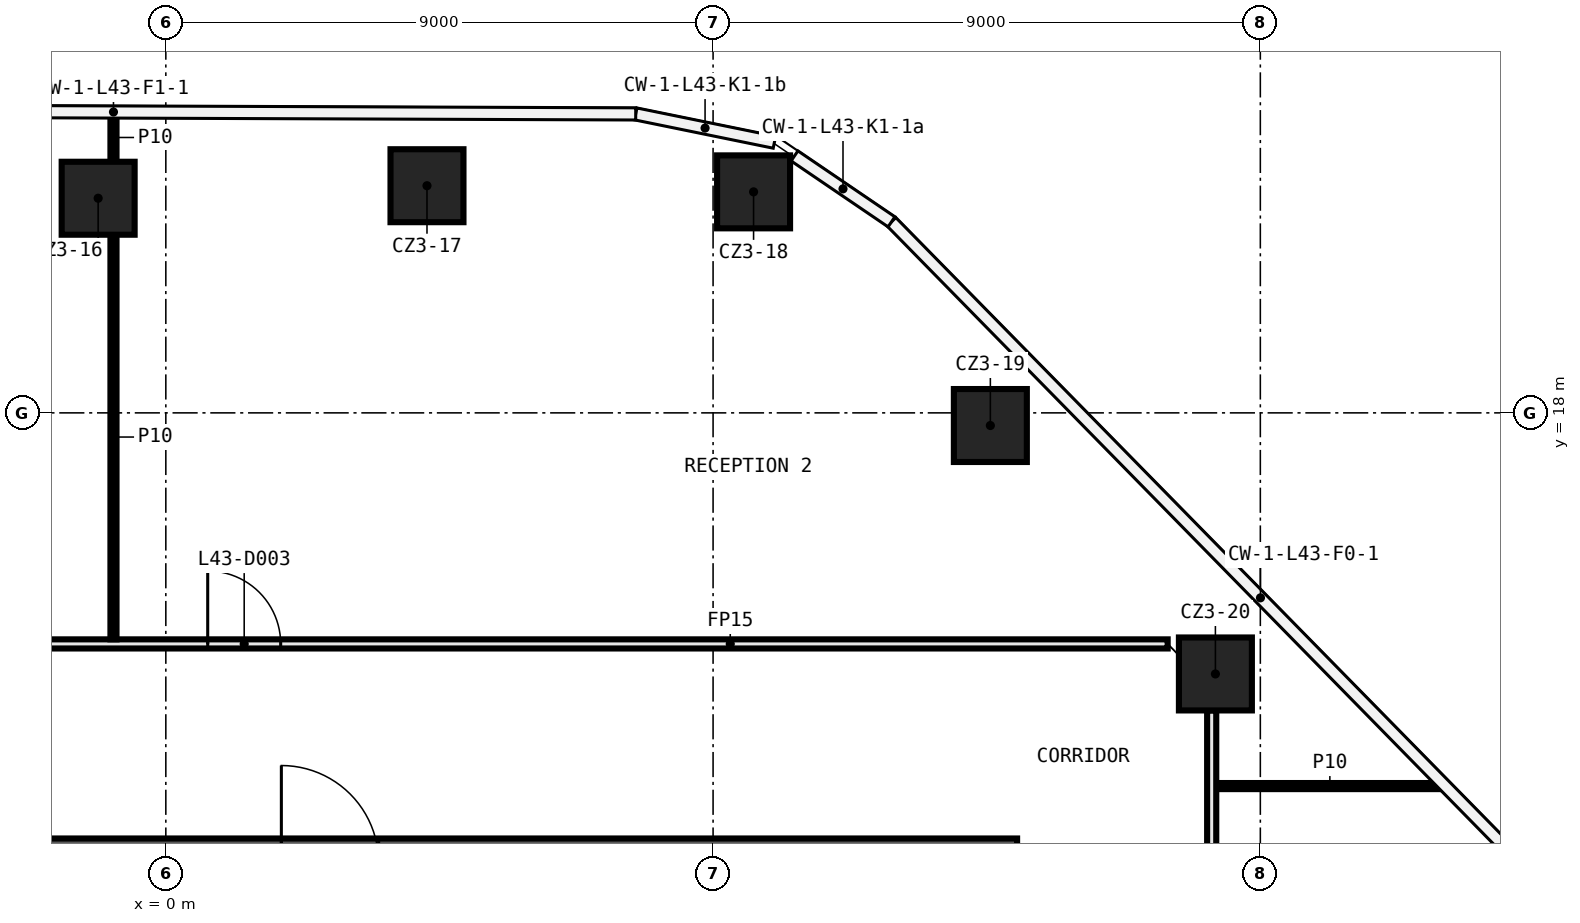
"""IFC4 building model, lengths in metres.
Left out: names, types, materials, properties, quantities, classifications, styles, units other than length and angle.
Written with IfcOpenShell. Run it as: python <this file> out.ifc"""

import sys

from ifc_helpers import new_model, si_unit, direction, frame, frame_2d, origin, origin_2d, place, context, subcontext, project, spatial, rectangle, extrude, element, fill, save


model = new_model("IFC4")
c1 = context("Model", 3, precision=1e-05, world=origin(), true_north=direction((0.0, 1.0)))
c2 = subcontext(c1, "Body", "Model", "MODEL_VIEW")
j1 = project(units=[si_unit("LENGTHUNIT", "METRE"), si_unit("PLANEANGLEUNIT", "RADIAN")], contexts=[c1])
p1 = place(None, origin())
s1 = spatial("IfcSite", under=j1, at=p1, CompositionType="ELEMENT")
p2 = place(p1, origin())
s2 = spatial("IfcBuilding", under=s1, at=p2, CompositionType="ELEMENT")
p3 = place(p2, frame((0.0, 0.0, 207.2)))
s3 = spatial("IfcBuildingStorey", under=s2, at=p3, CompositionType="ELEMENT", Elevation=207.2)
for number, where, z_axis, x_axis in (
    (1, (-1.113, 21.53, 0.0), (0.0, 0.0, 1.0), (1.0, 0.0, 0.0)),
    (2, (4.295, 21.736, 0.0), (0.0, 0.0, 1.0), (1.0, 0.0, 0.0)),
    (3, (9.666, 21.635, 0.0), (0.0, 0.0, 1.0), (1.0, 0.0, 0.0)),
    (4, (13.56, 17.792, 0.0), (0.0, 0.0, 1.0), (1.0, 0.0, 0.0)),
    (5, (17.261, 13.706, 0.0), (0.0, 0.0, 1.0), (1.0, 0.0, 0.0)),
):
    element("IfcColumn", number, at=place(p3, frame(where, z_axis=z_axis, x_axis=x_axis)), inside=s3, PredefinedType="COLUMN", context=c2, shape_type="SweptSolid", body=[
        extrude(rectangle(XDim=1.2, YDim=1.2, at=origin_2d()), origin(), (0.0, 0.0, 1.0), 3.82),
    ])
p4 = place(p3, frame((17.275, 11.862, 0.0), z_axis=(0.0, 0.0, 1.0), x_axis=(1.0, 0.0, 0.0)))
e6 = element("IfcWall", 6, at=p4, inside=s3, PredefinedType="PARTITIONING", context=c2, shape_type="SweptSolid", body=[
    extrude(rectangle(XDim=3.737, YDim=0.1, at=frame_2d((1.868, 0.0))), origin(), (0.0, 0.0, 1.0), 3.82),
])
p5 = place(p3, frame((-5.075, 14.2, 0.0), z_axis=(0.0, 0.0, 1.0), x_axis=(1.0, 0.0, 0.0)))
e7 = element("IfcWall", 7, at=p5, inside=s3, PredefinedType="PARTITIONING", context=c2, shape_type="SweptSolid", body=[
    extrude(rectangle(XDim=21.551, YDim=0.15, at=frame_2d((10.775, 0.0))), origin(), (0.0, 0.0, 1.0), 3.82),
])
p6 = place(p5, frame((5.764, 0.0, 0.0)))
e8 = element("IfcOpeningElement", 8, at=p6, cuts=e7, PredefinedType="OPENING", context=c2, shape_type="SweptSolid", body=[
    extrude(rectangle(XDim=1.2, YDim=2.1, at=frame_2d((0.6, 1.05))), frame((0.0, 0.085, 0.0), z_axis=(0.0, -1.0, 0.0), x_axis=(1.0, 0.0, 0.0)), (0.0, 0.0, 1.0), 0.17),
])
p7 = place(p5, frame((1.545, 0.0, 0.0)))
e9 = element("IfcOpeningElement", 9, at=p7, cuts=e7, PredefinedType="OPENING", context=c2, shape_type="SweptSolid", body=[
    extrude(rectangle(XDim=1.2, YDim=2.1, at=frame_2d((0.6, 1.05))), frame((0.0, 0.085, 0.0), z_axis=(0.0, -1.0, 0.0), x_axis=(1.0, 0.0, 0.0)), (0.0, 0.0, 1.0), 0.17),
])
p8 = place(p3, frame((17.2, 13.106, 0.0), z_axis=(0.0, 0.0, 1.0), x_axis=(0.0, -1.0, 0.0)))
e10 = element("IfcWall", 10, at=p8, inside=s3, PredefinedType="PARTITIONING", context=c2, shape_type="SweptSolid", body=[
    extrude(rectangle(XDim=23.172, YDim=0.15, at=frame_2d((11.586, 0.0))), origin(), (0.0, 0.0, 1.0), 3.82),
])
p9 = place(p8, frame((4.412, 0.0, 0.0)))
e11 = element("IfcOpeningElement", 11, at=p9, cuts=e10, PredefinedType="OPENING", context=c2, shape_type="SweptSolid", body=[
    extrude(rectangle(XDim=1.2, YDim=2.1, at=frame_2d((0.6, 1.05))), frame((0.0, 0.085, 0.0), z_axis=(0.0, -1.0, 0.0), x_axis=(1.0, 0.0, 0.0)), (0.0, 0.0, 1.0), 0.17),
])
p10 = place(p3, frame((-0.861, 14.275, 0.0), z_axis=(0.0, 0.0, 1.0), x_axis=(0.0, 1.0, 0.0)))
e12 = element("IfcWall", 12, at=p10, inside=s3, PredefinedType="PARTITIONING", context=c2, shape_type="SweptSolid", body=[
    extrude(rectangle(XDim=6.655, YDim=0.1, at=frame_2d((3.328, 0.0))), origin(), (0.0, 0.0, 1.0), 3.82),
])
p11 = place(p3, frame((-0.861, 22.13, 0.0), z_axis=(0.0, 0.0, 1.0), x_axis=(0.0, 1.0, 0.0)))
e13 = element("IfcWall", 13, at=p11, inside=s3, PredefinedType="PARTITIONING", context=c2, shape_type="SweptSolid", body=[
    extrude(rectangle(XDim=0.799, YDim=0.1, at=frame_2d((0.399, 0.0))), origin(), (0.0, 0.0, 1.0), 3.82),
])
p12 = place(p3, frame((-14.0, 10.6, 0.0), z_axis=(0.0, 0.0, 1.0), x_axis=(1.0, 0.0, 0.0)))
e14 = element("IfcWall", 14, at=p12, inside=s3, PredefinedType="SHEAR", context=c2, shape_type="SweptSolid", body=[
    extrude(rectangle(XDim=28.0, YDim=0.8, at=frame_2d((14.0, 0.0))), origin(), (0.0, 0.0, 1.0), 3.82),
])
p13 = place(p12, frame((15.9, 0.0, 0.0)))
e15 = element("IfcOpeningElement", 15, at=p13, cuts=e14, PredefinedType="OPENING", context=c2, shape_type="SweptSolid", body=[
    extrude(rectangle(XDim=1.6, YDim=2.1, at=frame_2d((0.8, 1.05))), frame((0.0, 0.41, 0.0), z_axis=(0.0, -1.0, 0.0), x_axis=(1.0, 0.0, 0.0)), (0.0, 0.0, 1.0), 0.82),
])
p14 = place(p6, origin())
e16 = element("IfcDoor", 16, at=p14, inside=s3, OperationType="SINGLE_SWING_RIGHT", PredefinedType="DOOR", context=c2, shape_type="SweptSolid", body=[
    extrude(rectangle(XDim=1.2, YDim=2.1, at=frame_2d((0.6, 1.05))), frame((0.0, 0.025, 0.0), z_axis=(0.0, -1.0, 0.0), x_axis=(1.0, 0.0, 0.0)), (0.0, 0.0, 1.0), 0.05),
])
fill(e8, e16)
save(model, sys.argv[1])
